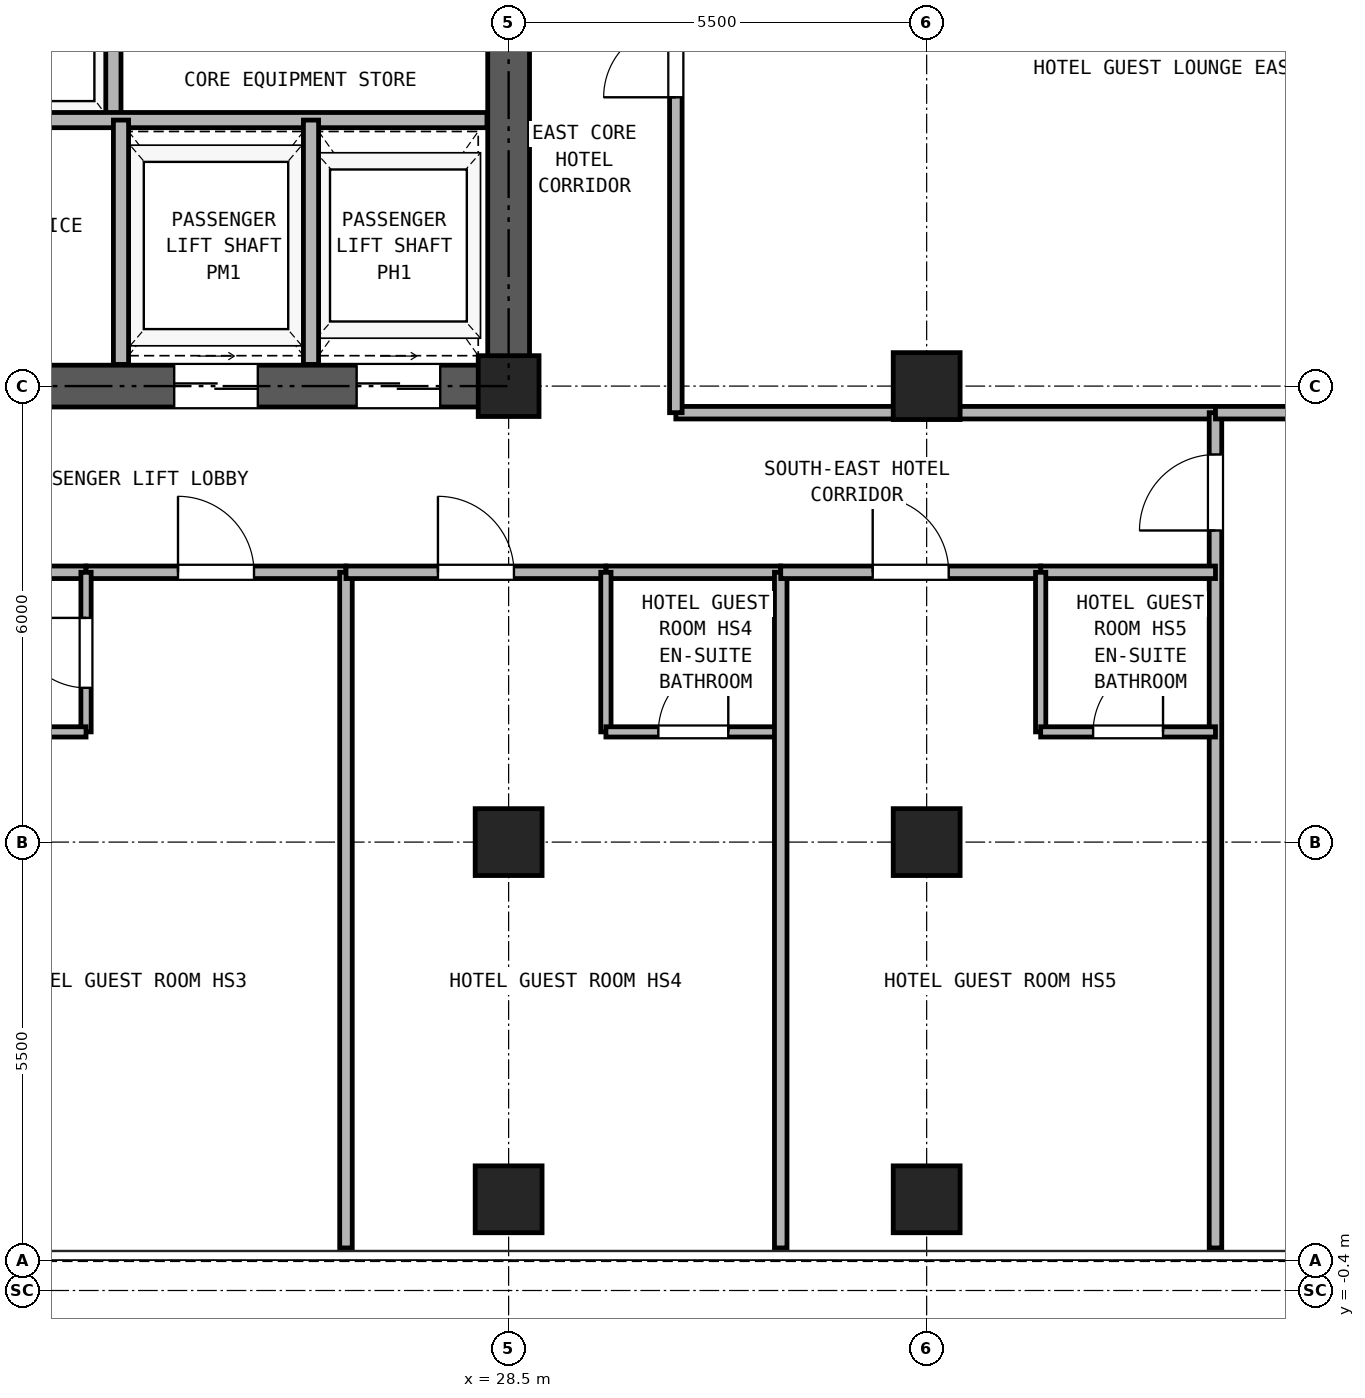
"""IFC4 building model, lengths in metres.
Left out: names, types, materials, properties, quantities, classifications, styles, units other than length and angle.
Written with IfcOpenShell. Run it as: python <this file> out.ifc"""

import sys

from ifc_helpers import new_model, si_unit, direction, frame, frame_2d, origin, origin_2d, place, context, subcontext, project, spatial, rectangle, hollow_rectangle, extrude, source, transform, mapped, element, fill, save


model = new_model("IFC4")
c1 = context("Model", 3, precision=1e-05, world=origin(), true_north=direction((0.0, 1.0)))
c2 = subcontext(c1, "Body", "Model", "MODEL_VIEW")
j1 = project(units=[si_unit("LENGTHUNIT", "METRE"), si_unit("PLANEANGLEUNIT", "RADIAN")], contexts=[c1])
p1 = place(None, origin())
s1 = spatial("IfcSite", under=j1, at=p1, CompositionType="ELEMENT")
p2 = place(p1, origin())
s2 = spatial("IfcBuilding", under=s1, at=p2, CompositionType="ELEMENT")
p3 = place(p2, frame((0.0, 0.0, 102.3)))
s3 = spatial("IfcBuildingStorey", under=s2, at=p3, CompositionType="ELEMENT", Elevation=102.3)
m1 = source(origin(), c2, "Body", "SweptSolid", [
    extrude(hollow_rectangle(XDim=0.88, YDim=0.88, WallThickness=0.05, at=origin_2d()), origin(), (0.0, 0.0, 1.0), 2.95),
])
for number, where, z_axis, x_axis in (
    (1, (28.5, 0.8, 0.0), (0.0, 0.0, 1.0), (1.0, 0.0, 0.0)),
    (2, (34.0, 0.8, 0.0), (0.0, 0.0, 1.0), (1.0, 0.0, 0.0)),
    (3, (28.5, 5.5, 0.0), (0.0, 0.0, 1.0), (1.0, 0.0, 0.0)),
):
    element("IfcColumn", number, at=place(p3, frame(where, z_axis=z_axis, x_axis=x_axis)), inside=s3, PredefinedType="COLUMN", context=c2, shape_type="MappedRepresentation", body=[
        mapped(m1, transform((0.0, 0.0, 0.0), x_axis=(1.0, 0.0, 0.0), y_axis=(0.0, 1.0, 0.0), z_axis=(0.0, 0.0, 1.0), scale=1.0)),
    ])
m2 = source(origin(), c2, "Body", "SweptSolid", [
    extrude(hollow_rectangle(XDim=0.8, YDim=0.8, WallThickness=0.045, at=origin_2d()), origin(), (0.0, 0.0, 1.0), 2.95),
])
p4 = place(p3, frame((28.5, 11.5, 0.0), z_axis=(0.0, 0.0, 1.0), x_axis=(1.0, 0.0, 0.0)))
e4 = element("IfcColumn", 4, at=p4, inside=s3, PredefinedType="COLUMN", context=c2, shape_type="MappedRepresentation", body=[
    mapped(m2, transform((0.0, 0.0, 0.0), x_axis=(1.0, 0.0, 0.0), y_axis=(0.0, 1.0, 0.0), z_axis=(0.0, 0.0, 1.0), scale=1.0)),
])
for number, where, z_axis, x_axis in (
    (5, (34.0, 5.5, 0.0), (0.0, 0.0, 1.0), (1.0, 0.0, 0.0)),
    (6, (34.0, 11.5, 0.0), (0.0, 0.0, 1.0), (1.0, 0.0, 0.0)),
):
    element("IfcColumn", number, at=place(p3, frame(where, z_axis=z_axis, x_axis=x_axis)), inside=s3, PredefinedType="COLUMN", context=c2, shape_type="MappedRepresentation", body=[
        mapped(m1, transform((0.0, 0.0, 0.0), x_axis=(1.0, 0.0, 0.0), y_axis=(0.0, 1.0, 0.0), z_axis=(0.0, 0.0, 1.0), scale=1.0)),
    ])
p5 = place(p3, frame((18.225, 11.5, 0.0), z_axis=(0.0, 0.0, 1.0), x_axis=(1.0, 0.0, 0.0)))
e7 = element("IfcWall", 7, at=p5, inside=s3, PredefinedType="SHEAR", context=c2, shape_type="SweptSolid", body=[
    extrude(rectangle(XDim=10.55, YDim=0.55, at=frame_2d((5.275, 0.0))), origin(), (0.0, 0.0, 1.0), 2.95),
])
p6 = place(p5, frame((2.375, 0.0, 0.0)))
e8 = element("IfcOpeningElement", 8, at=p6, cuts=e7, PredefinedType="OPENING", context=c2, shape_type="SweptSolid", body=[
    extrude(rectangle(XDim=0.95, YDim=2.15, at=frame_2d((0.475, 1.075))), frame((0.0, 0.285, 0.0), z_axis=(0.0, -1.0, 0.0), x_axis=(1.0, 0.0, 0.0)), (0.0, 0.0, 1.0), 0.57),
])
p7 = place(p5, frame((5.875, 0.0, 0.0)))
e9 = element("IfcOpeningElement", 9, at=p7, cuts=e7, PredefinedType="OPENING", context=c2, shape_type="SweptSolid", body=[
    extrude(rectangle(XDim=1.1, YDim=2.25, at=frame_2d((0.55, 1.125))), frame((0.0, 0.285, 0.0), z_axis=(0.0, -1.0, 0.0), x_axis=(1.0, 0.0, 0.0)), (0.0, 0.0, 1.0), 0.57),
])
p8 = place(p5, frame((8.275, 0.0, 0.0)))
e10 = element("IfcOpeningElement", 10, at=p8, cuts=e7, PredefinedType="OPENING", context=c2, shape_type="SweptSolid", body=[
    extrude(rectangle(XDim=1.1, YDim=2.25, at=frame_2d((0.55, 1.125))), frame((0.0, 0.285, 0.0), z_axis=(0.0, -1.0, 0.0), x_axis=(1.0, 0.0, 0.0)), (0.0, 0.0, 1.0), 0.57),
])
p9 = place(p3, frame((28.5, 11.775, 0.0), z_axis=(0.0, 0.0, 1.0), x_axis=(0.0, 1.0, 0.0)))
e11 = element("IfcWall", 11, at=p9, inside=s3, PredefinedType="SHEAR", context=c2, shape_type="SweptSolid", body=[
    extrude(rectangle(XDim=16.7, YDim=0.55, at=frame_2d((8.35, 0.0))), origin(), (0.0, 0.0, 1.0), 2.95),
])
p10 = place(p9, frame((7.375, 0.0, 0.0)))
e12 = element("IfcOpeningElement", 12, at=p10, cuts=e11, PredefinedType="OPENING", context=c2, shape_type="SweptSolid", body=[
    extrude(rectangle(XDim=1.15, YDim=2.2, at=frame_2d((0.575, 1.1))), frame((0.0, 0.285, 0.0), z_axis=(0.0, -1.0, 0.0), x_axis=(1.0, 0.0, 0.0)), (0.0, 0.0, 1.0), 0.57),
])
p11 = place(p3, frame((23.3, 15.0, 0.0), z_axis=(0.0, 0.0, 1.0), x_axis=(0.0, 1.0, 0.0)))
e13 = element("IfcWall", 13, at=p11, inside=s3, PredefinedType="PARTITIONING", context=c2, shape_type="SweptSolid", body=[
    extrude(rectangle(XDim=3.0, YDim=0.2, at=frame_2d((1.5, 0.0))), origin(), (0.0, 0.0, 1.0), 2.95),
])
p12 = place(p3, frame((18.785, 15.0, 0.0), z_axis=(0.0, 0.0, 1.0), x_axis=(1.0, 0.0, 0.0)))
e14 = element("IfcWall", 14, at=p12, inside=s3, PredefinedType="PARTITIONING", context=c2, shape_type="SweptSolid", body=[
    extrude(rectangle(XDim=9.43, YDim=0.2, at=frame_2d((4.715, 0.0))), origin(), (0.0, 0.0, 1.0), 2.95),
])
for number, where, z_axis, x_axis in (
    (15, (23.4, 11.785, 0.0), (0.0, 0.0, 1.0), (0.0, 1.0, 0.0)),
    (16, (25.9, 11.785, 0.0), (0.0, 0.0, 1.0), (0.0, 1.0, 0.0)),
):
    element("IfcWall", number, at=place(p3, frame(where, z_axis=z_axis, x_axis=x_axis)), inside=s3, PredefinedType="PARTITIONING", context=c2, shape_type="SweptSolid", body=[
        extrude(rectangle(XDim=3.215, YDim=0.2, at=frame_2d((1.607, 0.0))), origin(), (0.0, 0.0, 1.0), 2.95),
    ])
p13 = place(p3, frame((30.7, 11.15, 0.0), z_axis=(0.0, 0.0, 1.0), x_axis=(1.0, 0.0, 0.0)))
e17 = element("IfcWall", 17, at=p13, inside=s3, PredefinedType="PARTITIONING", context=c2, shape_type="SweptSolid", body=[
    extrude(rectangle(XDim=7.1, YDim=0.165, at=frame_2d((3.55, 0.0))), origin(), (0.0, 0.0, 1.0), 2.95),
])
p14 = place(p3, frame((30.7, 11.15, 0.0), z_axis=(0.0, 0.0, 1.0), x_axis=(0.0, 1.0, 0.0)))
e18 = element("IfcWall", 18, at=p14, inside=s3, PredefinedType="PARTITIONING", context=c2, shape_type="SweptSolid", body=[
    extrude(rectangle(XDim=18.6, YDim=0.165, at=frame_2d((9.3, 0.0))), origin(), (0.0, 0.0, 1.0), 2.95),
])
p15 = place(p14, frame((4.15, 0.0, 0.0)))
e19 = element("IfcOpeningElement", 19, at=p15, cuts=e18, PredefinedType="OPENING", context=c2, shape_type="SweptSolid", body=[
    extrude(rectangle(XDim=0.95, YDim=2.15, at=frame_2d((0.475, 1.075))), frame((0.0, 0.093, 0.0), z_axis=(0.0, -1.0, 0.0), x_axis=(1.0, 0.0, 0.0)), (0.0, 0.0, 1.0), 0.185),
])
p16 = place(p14, frame((13.45, 0.0, 0.0)))
e20 = element("IfcOpeningElement", 20, at=p16, cuts=e18, PredefinedType="OPENING", context=c2, shape_type="SweptSolid", body=[
    extrude(rectangle(XDim=0.95, YDim=2.15, at=frame_2d((0.475, 1.075))), frame((0.0, 0.093, 0.0), z_axis=(0.0, -1.0, 0.0), x_axis=(1.0, 0.0, 0.0)), (0.0, 0.0, 1.0), 0.185),
])
p17 = place(p3, frame((37.8, 0.16, 0.0), z_axis=(0.0, 0.0, 1.0), x_axis=(0.0, 1.0, 0.0)))
e21 = element("IfcWall", 21, at=p17, inside=s3, PredefinedType="PARTITIONING", context=c2, shape_type="SweptSolid", body=[
    extrude(rectangle(XDim=10.99, YDim=0.165, at=frame_2d((5.495, 0.0))), origin(), (0.0, 0.0, 1.0), 2.95),
])
p18 = place(p17, frame((9.44, 0.0, 0.0)))
e22 = element("IfcOpeningElement", 22, at=p18, cuts=e21, PredefinedType="OPENING", context=c2, shape_type="SweptSolid", body=[
    extrude(rectangle(XDim=1.0, YDim=2.15, at=frame_2d((0.5, 1.075))), frame((0.0, 0.093, 0.0), z_axis=(0.0, -1.0, 0.0), x_axis=(1.0, 0.0, 0.0)), (0.0, 0.0, 1.0), 0.185),
])
p19 = place(p3, frame((37.8, 11.15, 0.0), z_axis=(0.0, 0.0, 1.0), x_axis=(1.0, 0.0, 0.0)))
e23 = element("IfcWall", 23, at=p19, inside=s3, PredefinedType="PARTITIONING", context=c2, shape_type="SweptSolid", body=[
    extrude(rectangle(XDim=9.04, YDim=0.165, at=frame_2d((4.52, 0.0))), origin(), (0.0, 0.0, 1.0), 2.95),
])
p20 = place(p3, frame((20.64, 9.05, 0.0), z_axis=(0.0, 0.0, 1.0), x_axis=(1.0, 0.0, 0.0)))
e24 = element("IfcWall", 24, at=p20, inside=s3, PredefinedType="PARTITIONING", context=c2, shape_type="SweptSolid", body=[
    extrude(rectangle(XDim=2.3, YDim=0.165, at=frame_2d((1.15, 0.0))), origin(), (0.0, 0.0, 1.0), 2.95),
])
p21 = place(p3, frame((22.94, 9.05, 0.0), z_axis=(0.0, 0.0, 1.0), x_axis=(1.0, 0.0, 0.0)))
e25 = element("IfcWall", 25, at=p21, inside=s3, PredefinedType="PARTITIONING", context=c2, shape_type="SweptSolid", body=[
    extrude(rectangle(XDim=3.42, YDim=0.165, at=frame_2d((1.71, 0.0))), origin(), (0.0, 0.0, 1.0), 2.95),
])
p22 = place(p21, frame((1.21, 0.0, 0.0)))
e26 = element("IfcOpeningElement", 26, at=p22, cuts=e25, PredefinedType="OPENING", context=c2, shape_type="SweptSolid", body=[
    extrude(rectangle(XDim=1.0, YDim=2.15, at=frame_2d((0.5, 1.075))), frame((0.0, 0.093, 0.0), z_axis=(0.0, -1.0, 0.0), x_axis=(1.0, 0.0, 0.0)), (0.0, 0.0, 1.0), 0.185),
])
p23 = place(p3, frame((22.94, 6.95, 0.0), z_axis=(0.0, 0.0, 1.0), x_axis=(0.0, 1.0, 0.0)))
e27 = element("IfcWall", 27, at=p23, inside=s3, PredefinedType="PARTITIONING", context=c2, shape_type="SweptSolid", body=[
    extrude(rectangle(XDim=2.1, YDim=0.135, at=frame_2d((1.05, 0.0))), origin(), (0.0, 0.0, 1.0), 2.95),
])
p24 = place(p23, frame((0.58, 0.0, 0.0)))
e28 = element("IfcOpeningElement", 28, at=p24, cuts=e27, PredefinedType="OPENING", context=c2, shape_type="SweptSolid", body=[
    extrude(rectangle(XDim=0.92, YDim=2.1, at=frame_2d((0.46, 1.05))), frame((0.0, 0.077, 0.0), z_axis=(0.0, -1.0, 0.0), x_axis=(1.0, 0.0, 0.0)), (0.0, 0.0, 1.0), 0.155),
])
p25 = place(p3, frame((20.64, 6.95, 0.0), z_axis=(0.0, 0.0, 1.0), x_axis=(1.0, 0.0, 0.0)))
e29 = element("IfcWall", 29, at=p25, inside=s3, PredefinedType="PARTITIONING", context=c2, shape_type="SweptSolid", body=[
    extrude(rectangle(XDim=2.3, YDim=0.135, at=frame_2d((1.15, 0.0))), origin(), (0.0, 0.0, 1.0), 2.95),
])
p26 = place(p3, frame((26.36, 0.16, 0.0), z_axis=(0.0, 0.0, 1.0), x_axis=(0.0, 1.0, 0.0)))
e30 = element("IfcWall", 30, at=p26, inside=s3, PredefinedType="PARTITIONING", context=c2, shape_type="SweptSolid", body=[
    extrude(rectangle(XDim=8.89, YDim=0.165, at=frame_2d((4.445, 0.0))), origin(), (0.0, 0.0, 1.0), 2.95),
])
p27 = place(p3, frame((29.78, 9.05, 0.0), z_axis=(0.0, 0.0, 1.0), x_axis=(1.0, 0.0, 0.0)))
e31 = element("IfcWall", 31, at=p27, inside=s3, PredefinedType="PARTITIONING", context=c2, shape_type="SweptSolid", body=[
    extrude(rectangle(XDim=2.3, YDim=0.165, at=frame_2d((1.15, 0.0))), origin(), (0.0, 0.0, 1.0), 2.95),
])
p28 = place(p3, frame((26.36, 9.05, 0.0), z_axis=(0.0, 0.0, 1.0), x_axis=(1.0, 0.0, 0.0)))
e32 = element("IfcWall", 32, at=p28, inside=s3, PredefinedType="PARTITIONING", context=c2, shape_type="SweptSolid", body=[
    extrude(rectangle(XDim=3.42, YDim=0.165, at=frame_2d((1.71, 0.0))), origin(), (0.0, 0.0, 1.0), 2.95),
])
p29 = place(p28, frame((1.21, 0.0, 0.0)))
e33 = element("IfcOpeningElement", 33, at=p29, cuts=e32, PredefinedType="OPENING", context=c2, shape_type="SweptSolid", body=[
    extrude(rectangle(XDim=1.0, YDim=2.15, at=frame_2d((0.5, 1.075))), frame((0.0, 0.093, 0.0), z_axis=(0.0, -1.0, 0.0), x_axis=(1.0, 0.0, 0.0)), (0.0, 0.0, 1.0), 0.185),
])
p30 = place(p3, frame((29.78, 6.95, 0.0), z_axis=(0.0, 0.0, 1.0), x_axis=(0.0, 1.0, 0.0)))
e34 = element("IfcWall", 34, at=p30, inside=s3, PredefinedType="PARTITIONING", context=c2, shape_type="SweptSolid", body=[
    extrude(rectangle(XDim=2.1, YDim=0.135, at=frame_2d((1.05, 0.0))), origin(), (0.0, 0.0, 1.0), 2.95),
])
p31 = place(p3, frame((29.78, 6.95, 0.0), z_axis=(0.0, 0.0, 1.0), x_axis=(1.0, 0.0, 0.0)))
e35 = element("IfcWall", 35, at=p31, inside=s3, PredefinedType="PARTITIONING", context=c2, shape_type="SweptSolid", body=[
    extrude(rectangle(XDim=2.3, YDim=0.135, at=frame_2d((1.15, 0.0))), origin(), (0.0, 0.0, 1.0), 2.95),
])
p32 = place(p31, frame((0.69, 0.0, 0.0)))
e36 = element("IfcOpeningElement", 36, at=p32, cuts=e35, PredefinedType="OPENING", context=c2, shape_type="SweptSolid", body=[
    extrude(rectangle(XDim=0.92, YDim=2.1, at=frame_2d((0.46, 1.05))), frame((0.0, 0.077, 0.0), z_axis=(0.0, -1.0, 0.0), x_axis=(1.0, 0.0, 0.0)), (0.0, 0.0, 1.0), 0.155),
])
p33 = place(p3, frame((32.08, 0.16, 0.0), z_axis=(0.0, 0.0, 1.0), x_axis=(0.0, 1.0, 0.0)))
e37 = element("IfcWall", 37, at=p33, inside=s3, PredefinedType="PARTITIONING", context=c2, shape_type="SweptSolid", body=[
    extrude(rectangle(XDim=8.89, YDim=0.165, at=frame_2d((4.445, 0.0))), origin(), (0.0, 0.0, 1.0), 2.95),
])
p34 = place(p3, frame((35.5, 9.05, 0.0), z_axis=(0.0, 0.0, 1.0), x_axis=(1.0, 0.0, 0.0)))
e38 = element("IfcWall", 38, at=p34, inside=s3, PredefinedType="PARTITIONING", context=c2, shape_type="SweptSolid", body=[
    extrude(rectangle(XDim=2.3, YDim=0.165, at=frame_2d((1.15, 0.0))), origin(), (0.0, 0.0, 1.0), 2.95),
])
p35 = place(p3, frame((32.08, 9.05, 0.0), z_axis=(0.0, 0.0, 1.0), x_axis=(1.0, 0.0, 0.0)))
e39 = element("IfcWall", 39, at=p35, inside=s3, PredefinedType="PARTITIONING", context=c2, shape_type="SweptSolid", body=[
    extrude(rectangle(XDim=3.42, YDim=0.165, at=frame_2d((1.71, 0.0))), origin(), (0.0, 0.0, 1.0), 2.95),
])
p36 = place(p35, frame((1.21, 0.0, 0.0)))
e40 = element("IfcOpeningElement", 40, at=p36, cuts=e39, PredefinedType="OPENING", context=c2, shape_type="SweptSolid", body=[
    extrude(rectangle(XDim=1.0, YDim=2.15, at=frame_2d((0.5, 1.075))), frame((0.0, 0.093, 0.0), z_axis=(0.0, -1.0, 0.0), x_axis=(1.0, 0.0, 0.0)), (0.0, 0.0, 1.0), 0.185),
])
p37 = place(p3, frame((35.5, 6.95, 0.0), z_axis=(0.0, 0.0, 1.0), x_axis=(0.0, 1.0, 0.0)))
e41 = element("IfcWall", 41, at=p37, inside=s3, PredefinedType="PARTITIONING", context=c2, shape_type="SweptSolid", body=[
    extrude(rectangle(XDim=2.1, YDim=0.135, at=frame_2d((1.05, 0.0))), origin(), (0.0, 0.0, 1.0), 2.95),
])
p38 = place(p3, frame((35.5, 6.95, 0.0), z_axis=(0.0, 0.0, 1.0), x_axis=(1.0, 0.0, 0.0)))
e42 = element("IfcWall", 42, at=p38, inside=s3, PredefinedType="PARTITIONING", context=c2, shape_type="SweptSolid", body=[
    extrude(rectangle(XDim=2.3, YDim=0.135, at=frame_2d((1.15, 0.0))), origin(), (0.0, 0.0, 1.0), 2.95),
])
p39 = place(p38, frame((0.69, 0.0, 0.0)))
e43 = element("IfcOpeningElement", 43, at=p39, cuts=e42, PredefinedType="OPENING", context=c2, shape_type="SweptSolid", body=[
    extrude(rectangle(XDim=0.92, YDim=2.1, at=frame_2d((0.46, 1.05))), frame((0.0, 0.077, 0.0), z_axis=(0.0, -1.0, 0.0), x_axis=(1.0, 0.0, 0.0)), (0.0, 0.0, 1.0), 0.155),
])
p40 = place(p7, frame((1.1, 0.0, 0.0), z_axis=(0.0, 0.0, 1.0), x_axis=(-1.0, 0.0, 0.0)))
e44 = element("IfcDoor", 44, at=p40, inside=s3, OperationType="DOUBLE_DOOR_SLIDING", PredefinedType="DOOR", context=c2, shape_type="SweptSolid", body=[
    extrude(rectangle(XDim=1.1, YDim=2.25, at=frame_2d((0.55, 1.125))), frame((0.0, 0.025, 0.0), z_axis=(0.0, -1.0, 0.0), x_axis=(1.0, 0.0, 0.0)), (0.0, 0.0, 1.0), 0.05),
])
fill(e9, e44)
p41 = place(p8, frame((1.1, 0.0, 0.0), z_axis=(0.0, 0.0, 1.0), x_axis=(-1.0, 0.0, 0.0)))
e45 = element("IfcDoor", 45, at=p41, inside=s3, OperationType="DOUBLE_DOOR_SLIDING", PredefinedType="DOOR", context=c2, shape_type="SweptSolid", body=[
    extrude(rectangle(XDim=1.1, YDim=2.25, at=frame_2d((0.55, 1.125))), frame((0.0, 0.025, 0.0), z_axis=(0.0, -1.0, 0.0), x_axis=(1.0, 0.0, 0.0)), (0.0, 0.0, 1.0), 0.05),
])
fill(e10, e45)
p42 = place(p18, frame((1.0, 0.0, 0.0), z_axis=(0.0, 0.0, 1.0), x_axis=(-1.0, 0.0, 0.0)))
e46 = element("IfcDoor", 46, at=p42, inside=s3, OperationType="SINGLE_SWING_LEFT", PredefinedType="DOOR", context=c2, shape_type="SweptSolid", body=[
    extrude(rectangle(XDim=1.0, YDim=2.15, at=frame_2d((0.5, 1.075))), frame((0.0, 0.025, 0.0), z_axis=(0.0, -1.0, 0.0), x_axis=(1.0, 0.0, 0.0)), (0.0, 0.0, 1.0), 0.05),
])
fill(e22, e46)
p43 = place(p24, frame((0.92, 0.0, 0.0), z_axis=(0.0, 0.0, 1.0), x_axis=(-1.0, 0.0, 0.0)))
e47 = element("IfcDoor", 47, at=p43, inside=s3, OperationType="SINGLE_SWING_RIGHT", PredefinedType="DOOR", context=c2, shape_type="SweptSolid", body=[
    extrude(rectangle(XDim=0.92, YDim=2.1, at=frame_2d((0.46, 1.05))), frame((0.0, 0.025, 0.0), z_axis=(0.0, -1.0, 0.0), x_axis=(1.0, 0.0, 0.0)), (0.0, 0.0, 1.0), 0.05),
])
fill(e28, e47)
p44 = place(p22, frame((1.0, 0.0, 0.0), z_axis=(0.0, 0.0, 1.0), x_axis=(-1.0, 0.0, 0.0)))
e48 = element("IfcDoor", 48, at=p44, inside=s3, OperationType="SINGLE_SWING_LEFT", PredefinedType="DOOR", context=c2, shape_type="SweptSolid", body=[
    extrude(rectangle(XDim=1.0, YDim=2.15, at=frame_2d((0.5, 1.075))), frame((0.0, 0.025, 0.0), z_axis=(0.0, -1.0, 0.0), x_axis=(1.0, 0.0, 0.0)), (0.0, 0.0, 1.0), 0.05),
])
fill(e26, e48)
p45 = place(p32, origin())
e49 = element("IfcDoor", 49, at=p45, inside=s3, OperationType="SINGLE_SWING_RIGHT", PredefinedType="DOOR", context=c2, shape_type="SweptSolid", body=[
    extrude(rectangle(XDim=0.92, YDim=2.1, at=frame_2d((0.46, 1.05))), frame((0.0, 0.025, 0.0), z_axis=(0.0, -1.0, 0.0), x_axis=(1.0, 0.0, 0.0)), (0.0, 0.0, 1.0), 0.05),
])
fill(e36, e49)
p46 = place(p29, frame((1.0, 0.0, 0.0), z_axis=(0.0, 0.0, 1.0), x_axis=(-1.0, 0.0, 0.0)))
e50 = element("IfcDoor", 50, at=p46, inside=s3, OperationType="SINGLE_SWING_LEFT", PredefinedType="DOOR", context=c2, shape_type="SweptSolid", body=[
    extrude(rectangle(XDim=1.0, YDim=2.15, at=frame_2d((0.5, 1.075))), frame((0.0, 0.025, 0.0), z_axis=(0.0, -1.0, 0.0), x_axis=(1.0, 0.0, 0.0)), (0.0, 0.0, 1.0), 0.05),
])
fill(e33, e50)
p47 = place(p39, origin())
e51 = element("IfcDoor", 51, at=p47, inside=s3, OperationType="SINGLE_SWING_RIGHT", PredefinedType="DOOR", context=c2, shape_type="SweptSolid", body=[
    extrude(rectangle(XDim=0.92, YDim=2.1, at=frame_2d((0.46, 1.05))), frame((0.0, 0.025, 0.0), z_axis=(0.0, -1.0, 0.0), x_axis=(1.0, 0.0, 0.0)), (0.0, 0.0, 1.0), 0.05),
])
fill(e43, e51)
p48 = place(p36, frame((1.0, 0.0, 0.0), z_axis=(0.0, 0.0, 1.0), x_axis=(-1.0, 0.0, 0.0)))
e52 = element("IfcDoor", 52, at=p48, inside=s3, OperationType="SINGLE_SWING_LEFT", PredefinedType="DOOR", context=c2, shape_type="SweptSolid", body=[
    extrude(rectangle(XDim=1.0, YDim=2.15, at=frame_2d((0.5, 1.075))), frame((0.0, 0.025, 0.0), z_axis=(0.0, -1.0, 0.0), x_axis=(1.0, 0.0, 0.0)), (0.0, 0.0, 1.0), 0.05),
])
fill(e40, e52)
p49 = place(p15, origin())
e53 = element("IfcDoor", 53, at=p49, inside=s3, OperationType="SINGLE_SWING_LEFT", PredefinedType="DOOR", context=c2, shape_type="SweptSolid", body=[
    extrude(rectangle(XDim=0.95, YDim=2.15, at=frame_2d((0.475, 1.075))), frame((0.0, 0.025, 0.0), z_axis=(0.0, -1.0, 0.0), x_axis=(1.0, 0.0, 0.0)), (0.0, 0.0, 1.0), 0.05),
])
fill(e19, e53)
save(model, sys.argv[1])
